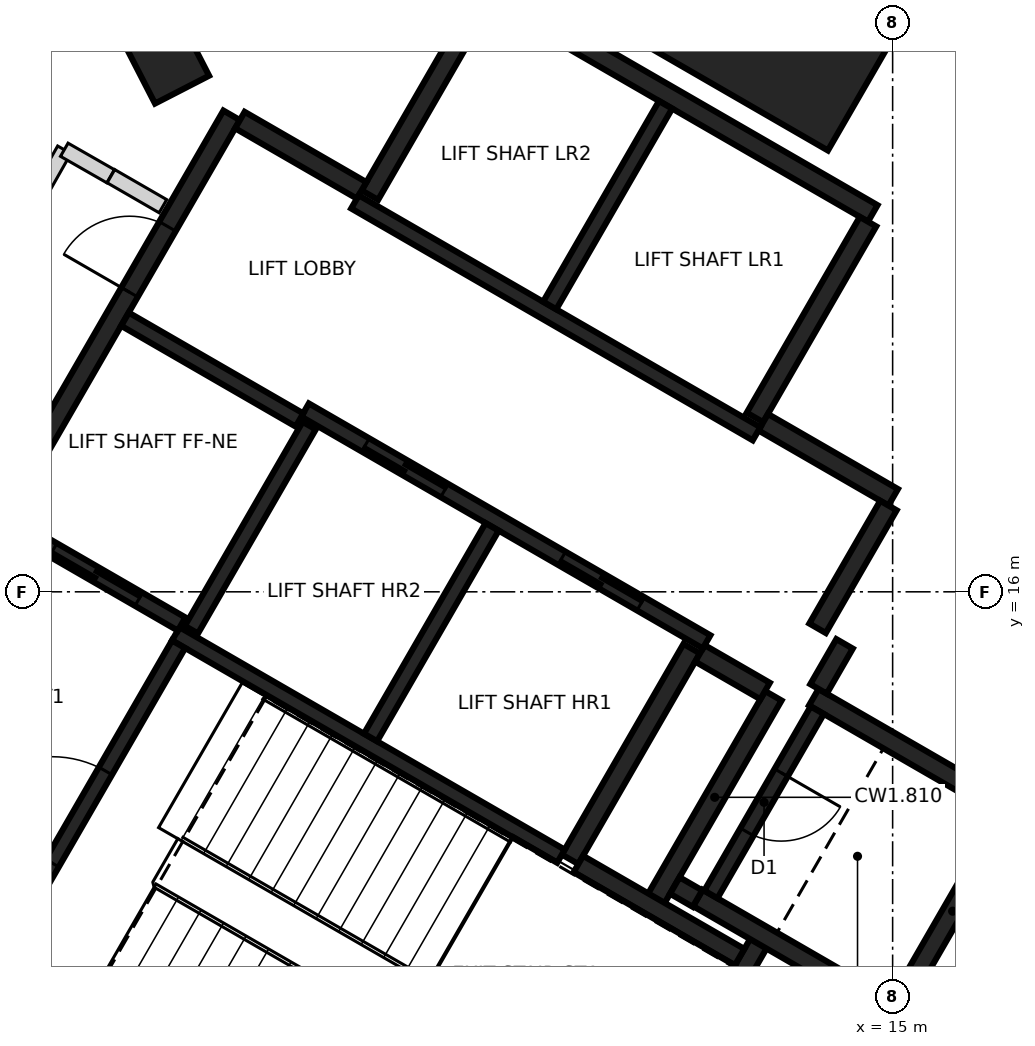
"""IFC4 building model, lengths in metres.
Left out: names, types, materials, properties, quantities, classifications, styles, units other than length and angle.
Written with IfcOpenShell. Run it as: python <this file> out.ifc"""

import sys

from ifc_helpers import new_model, si_unit, direction, frame, frame_2d, origin, origin_2d, place, context, subcontext, project, spatial, rectangle, extrude, element, fill, save


model = new_model("IFC4")
c1 = context("Model", 3, precision=1e-05, world=origin(), true_north=direction((0.0, 1.0)))
c2 = subcontext(c1, "Body", "Model", "MODEL_VIEW")
j1 = project(units=[si_unit("LENGTHUNIT", "METRE"), si_unit("PLANEANGLEUNIT", "RADIAN")], contexts=[c1])
p1 = place(None, origin())
s1 = spatial("IfcSite", under=j1, at=p1, CompositionType="ELEMENT")
p2 = place(p1, origin())
s2 = spatial("IfcBuilding", under=s1, at=p2, CompositionType="ELEMENT")
p3 = place(p2, frame((0.0, 0.0, 175.6)))
s3 = spatial("IfcBuildingStorey", under=s2, at=p3, CompositionType="ELEMENT", Elevation=175.6)
p4 = place(p3, frame((5.388, 23.118, -0.35), z_axis=(0.0, 0.0, 1.0), x_axis=(-0.457548042569, 0.889184901323, 0.0)))
e1 = element("IfcColumn", 1, at=p4, inside=s3, PredefinedType="COLUMN", context=c2, shape_type="SweptSolid", body=[
    extrude(rectangle(XDim=1.15, YDim=0.8, at=origin_2d()), origin(), (0.0, 0.0, 1.0), 3.6),
])
p5 = place(p3, frame((13.78, 23.867, -0.35), z_axis=(0.0, 0.0, 1.0), x_axis=(0.5, 0.866025403784, 0.0)))
e2 = element("IfcColumn", 2, at=p5, inside=s3, PredefinedType="COLUMN", context=c2, shape_type="SweptSolid", body=[
    extrude(rectangle(XDim=3.2, YDim=2.7, at=origin_2d()), origin(), (0.0, 0.0, 1.0), 3.6),
])
p6 = place(p3, frame((10.42, 6.498, 0.0), z_axis=(0.0, 0.0, 1.0), x_axis=(-0.866021906294, 0.500006057782, 0.0)))
e3 = element("IfcWall", 3, at=p6, inside=s3, PredefinedType="SHEAR", context=c2, shape_type="SweptSolid", body=[
    extrude(rectangle(XDim=11.55, YDim=0.25, at=frame_2d((5.775, 0.0))), origin(), (0.0, 0.0, 1.0), 3.25),
])
p7 = place(p6, frame((10.025, 0.0, 0.0)))
e4 = element("IfcOpeningElement", 4, at=p7, cuts=e3, PredefinedType="OPENING", context=c2, shape_type="SweptSolid", body=[
    extrude(rectangle(XDim=1.2, YDim=2.1, at=frame_2d((0.6, 1.05))), frame((0.0, 0.135, 0.0), z_axis=(0.0, -1.0, 0.0), x_axis=(1.0, 0.0, 0.0)), (0.0, 0.0, 1.0), 0.27),
])
p8 = place(p6, frame((8.725, 0.0, 0.0)))
e5 = element("IfcOpeningElement", 5, at=p8, cuts=e3, PredefinedType="OPENING", context=c2, shape_type="SweptSolid", body=[
    extrude(rectangle(XDim=1.2, YDim=2.1, at=frame_2d((0.6, 1.05))), frame((0.0, 0.135, 0.0), z_axis=(0.0, -1.0, 0.0), x_axis=(1.0, 0.0, 0.0)), (0.0, 0.0, 1.0), 0.27),
])
p9 = place(p3, frame((3.179, 16.856, 0.0), z_axis=(0.0, 0.0, 1.0), x_axis=(0.500004234368, 0.866022959057, 0.0)))
e6 = element("IfcWall", 6, at=p9, inside=s3, PredefinedType="SHEAR", context=c2, shape_type="SweptSolid", body=[
    extrude(rectangle(XDim=6.25, YDim=0.25, at=frame_2d((3.125, 0.0))), origin(), (0.0, 0.0, 1.0), 3.25),
])
p10 = place(p9, frame((3.563, 0.0, 0.0)))
e7 = element("IfcOpeningElement", 7, at=p10, cuts=e6, PredefinedType="OPENING", context=c2, shape_type="SweptSolid", body=[
    extrude(rectangle(XDim=1.0, YDim=2.1, at=frame_2d((0.5, 1.05))), frame((0.0, 0.135, 0.0), z_axis=(0.0, -1.0, 0.0), x_axis=(1.0, 0.0, 0.0)), (0.0, 0.0, 1.0), 0.27),
])
p11 = place(p3, frame((9.673, 23.903, 0.0), z_axis=(0.0, 0.0, 1.0), x_axis=(0.86603616409, -0.499981362141, 0.0)))
e8 = element("IfcWall", 8, at=p11, inside=s3, PredefinedType="SHEAR", context=c2, shape_type="SweptSolid", body=[
    extrude(rectangle(XDim=5.85, YDim=0.25, at=frame_2d((2.925, 0.0))), origin(), (0.0, 0.0, 1.0), 3.25),
])
p12 = place(p3, frame((13.238, 11.378, 0.0), z_axis=(0.0, 0.0, 1.0), x_axis=(-0.500008851346, -0.866020293397, 0.0)))
e9 = element("IfcWall", 9, at=p12, inside=s3, PredefinedType="SHEAR", context=c2, shape_type="SweptSolid", body=[
    extrude(rectangle(XDim=5.51, YDim=0.25, at=frame_2d((2.755, 0.0))), origin(), (0.0, 0.0, 1.0), 3.25),
])
p13 = place(p3, frame((12.357, 15.252, 0.0), z_axis=(0.0, 0.0, 1.0), x_axis=(-0.500028443584, -0.866008981251, 0.0)))
e10 = element("IfcWall", 10, at=p13, inside=s3, PredefinedType="SHEAR", context=c2, shape_type="SweptSolid", body=[
    extrude(rectangle(XDim=3.2, YDim=0.25, at=frame_2d((1.6, 0.0))), origin(), (0.0, 0.0, 1.0), 3.25),
])
for number, where, z_axis, x_axis in (
    (11, (8.123, 21.219, 0.0), (0.0, 0.0, 1.0), (0.5, 0.866, 0.0)),
    (12, (14.676, 20.87, 0.0), (0.0, 0.0, 1.0), (-0.5, -0.866, 0.0)),
):
    element("IfcWall", number, at=place(p3, frame(where, z_axis=z_axis, x_axis=x_axis)), inside=s3, PredefinedType="SHEAR", context=c2, shape_type="SweptSolid", body=[
        extrude(rectangle(XDim=2.975, YDim=0.25, at=frame_2d((1.487, 0.0))), origin(), (0.0, 0.0, 1.0), 3.25),
    ])
p14 = place(p3, frame((16.552, 13.119, 0.0), z_axis=(0.0, 0.0, 1.0), x_axis=(-0.499978833458, -0.866037623948, 0.0)))
e13 = element("IfcWall", 13, at=p14, inside=s3, PredefinedType="SHEAR", context=c2, shape_type="SweptSolid", body=[
    extrude(rectangle(XDim=3.05, YDim=0.25, at=frame_2d((1.525, 0.0))), origin(), (0.0, 0.0, 1.0), 3.25),
])
p15 = place(p3, frame((14.918, 10.54, 0.0), z_axis=(0.0, 0.0, 1.0), x_axis=(-0.866063538972, 0.499933942099, 0.0)))
e14 = element("IfcWall", 14, at=p15, inside=s3, PredefinedType="SHEAR", context=c2, shape_type="SweptSolid", body=[
    extrude(rectangle(XDim=2.865, YDim=0.25, at=frame_2d((1.432, 0.0))), origin(), (0.0, 0.0, 1.0), 3.25),
])
p16 = place(p3, frame((13.963, 14.614, 0.0), z_axis=(0.0, 0.0, 1.0), x_axis=(0.866042235819, -0.499970844928, 0.0)))
e15 = element("IfcWall", 15, at=p16, inside=s3, PredefinedType="SHEAR", context=c2, shape_type="SweptSolid", body=[
    extrude(rectangle(XDim=2.865, YDim=0.25, at=frame_2d((1.432, 0.0))), origin(), (0.0, 0.0, 1.0), 3.25),
])
p17 = place(p3, frame((11.888, 11.961, 0.0), z_axis=(0.0, 0.0, 1.0), x_axis=(0.500003324108, 0.866023484601, 0.0)))
e16 = element("IfcWall", 16, at=p17, inside=s3, PredefinedType="SHEAR", context=c2, shape_type="SweptSolid", body=[
    extrude(rectangle(XDim=3.085, YDim=0.25, at=frame_2d((1.542, 0.0))), origin(), (0.0, 0.0, 1.0), 3.25),
])
p18 = place(p3, frame((10.865, 12.418, 0.0), z_axis=(0.0, 0.0, 1.0), x_axis=(0.866026229868, -0.499998569178, 0.0)))
e17 = element("IfcWall", 17, at=p18, inside=s3, PredefinedType="SHEAR", context=c2, shape_type="SweptSolid", body=[
    extrude(rectangle(XDim=2.449, YDim=0.25, at=frame_2d((1.225, 0.0))), origin(), (0.0, 0.0, 1.0), 3.25),
])
p19 = place(p3, frame((13.297, 18.231, 0.0), z_axis=(0.0, 0.0, 1.0), x_axis=(0.866043531843, -0.499968599967, 0.0)))
e18 = element("IfcWall", 18, at=p19, inside=s3, PredefinedType="SHEAR", context=c2, shape_type="SweptSolid", body=[
    extrude(rectangle(XDim=1.975, YDim=0.25, at=frame_2d((0.987, 0.0))), origin(), (0.0, 0.0, 1.0), 3.25),
])
p20 = place(p3, frame((6.413, 22.206, 0.0), z_axis=(0.0, 0.0, 1.0), x_axis=(0.866016279763, -0.500015802937, 0.0)))
e19 = element("IfcWall", 19, at=p20, inside=s3, PredefinedType="SHEAR", context=c2, shape_type="SweptSolid", body=[
    extrude(rectangle(XDim=1.849, YDim=0.25, at=frame_2d((0.925, 0.0))), origin(), (0.0, 0.0, 1.0), 3.25),
])
p21 = place(p3, frame((14.945, 17.135, 0.0), z_axis=(0.0, 0.0, 1.0), x_axis=(-0.499983108224, -0.866035156036, 0.0)))
e20 = element("IfcWall", 20, at=p21, inside=s3, PredefinedType="SHEAR", context=c2, shape_type="SweptSolid", body=[
    extrude(rectangle(XDim=1.865, YDim=0.25, at=frame_2d((0.932, 0.0))), origin(), (0.0, 0.0, 1.0), 3.25),
])
p22 = place(p3, frame((13.322, 14.695, 0.0), z_axis=(0.0, 0.0, 1.0), x_axis=(-0.866017078145, 0.500014420154, 0.0)))
e21 = element("IfcWall", 21, at=p22, inside=s3, PredefinedType="SHEAR", context=c2, shape_type="SweptSolid", body=[
    extrude(rectangle(XDim=0.989, YDim=0.25, at=frame_2d((0.495, 0.0))), origin(), (0.0, 0.0, 1.0), 3.25),
])
p23 = place(p3, frame((14.368, 15.315, 0.0), z_axis=(0.0, 0.0, 1.0), x_axis=(-0.499897359611, -0.866084655132, 0.0)))
e22 = element("IfcWall", 22, at=p23, inside=s3, PredefinedType="SHEAR", context=c2, shape_type="SweptSolid", body=[
    extrude(rectangle(XDim=0.685, YDim=0.25, at=frame_2d((0.342, 0.0))), origin(), (0.0, 0.0, 1.0), 3.25),
])
p24 = place(p3, frame((12.433, 11.964, 0.0), z_axis=(0.0, 0.0, 1.0), x_axis=(-0.866055875208, 0.499947218231, 0.0)))
e23 = element("IfcWall", 23, at=p24, inside=s3, PredefinedType="SHEAR", context=c2, shape_type="SweptSolid", body=[
    extrude(rectangle(XDim=0.345, YDim=0.25, at=frame_2d((0.172, 0.0))), origin(), (0.0, 0.0, 1.0), 3.25),
])
p25 = place(p3, frame((13.21, 18.08, 0.0), z_axis=(0.0, 0.0, 1.0), x_axis=(-0.866030299012, 0.499991521122, 0.0)))
e24 = element("IfcWall", 24, at=p25, inside=s3, PredefinedType="SHEAR", context=c2, shape_type="SweptSolid", body=[
    extrude(rectangle(XDim=6.1, YDim=0.2, at=frame_2d((3.05, 0.0))), origin(), (0.0, 0.0, 1.0), 3.25),
])
p26 = place(p3, frame((12.552, 15.342, 0.0), z_axis=(0.0, 0.0, 1.0), x_axis=(-0.866030299012, 0.499991521122, 0.0)))
e25 = element("IfcWall", 25, at=p26, inside=s3, PredefinedType="SHEAR", context=c2, shape_type="SweptSolid", body=[
    extrude(rectangle(XDim=6.1, YDim=0.2, at=frame_2d((3.05, 0.0))), origin(), (0.0, 0.0, 1.0), 3.25),
])
p27 = place(p26, frame((1.0, 0.0, 0.0)))
e26 = element("IfcOpeningElement", 26, at=p27, cuts=e25, PredefinedType="OPENING", context=c2, shape_type="SweptSolid", body=[
    extrude(rectangle(XDim=1.2, YDim=2.1, at=frame_2d((0.6, 1.05))), frame((0.0, 0.11, 0.0), z_axis=(0.0, -1.0, 0.0), x_axis=(1.0, 0.0, 0.0)), (0.0, 0.0, 1.0), 0.22),
])
p28 = place(p26, frame((3.982, 0.0, 0.0)))
e27 = element("IfcOpeningElement", 27, at=p28, cuts=e25, PredefinedType="OPENING", context=c2, shape_type="SweptSolid", body=[
    extrude(rectangle(XDim=1.2, YDim=2.1, at=frame_2d((0.6, 1.05))), frame((0.0, 0.11, 0.0), z_axis=(0.0, -1.0, 0.0), x_axis=(1.0, 0.0, 0.0)), (0.0, 0.0, 1.0), 0.22),
])
p29 = place(p3, frame((10.636, 12.521, 0.0), z_axis=(0.0, 0.0, 1.0), x_axis=(-0.866013252188, 0.500021046592, 0.0)))
e28 = element("IfcWall", 28, at=p29, inside=s3, PredefinedType="SHEAR", context=c2, shape_type="SweptSolid", body=[
    extrude(rectangle(XDim=5.851, YDim=0.2, at=frame_2d((2.925, 0.0))), origin(), (0.0, 0.0, 1.0), 3.25),
])
p30 = place(p3, frame((3.057, 10.895, 0.0), z_axis=(0.0, 0.0, 1.0), x_axis=(0.500027839223, 0.866009330205, 0.0)))
e29 = element("IfcWall", 29, at=p30, inside=s3, PredefinedType="SHEAR", context=c2, shape_type="SweptSolid", body=[
    extrude(rectangle(XDim=5.098, YDim=0.2, at=frame_2d((2.549, 0.0))), origin(), (0.0, 0.0, 1.0), 3.25),
])
p31 = place(p30, frame((1.774, 0.0, 0.0)))
e30 = element("IfcOpeningElement", 30, at=p31, cuts=e29, PredefinedType="OPENING", context=c2, shape_type="SweptSolid", body=[
    extrude(rectangle(XDim=1.4, YDim=2.1, at=frame_2d((0.7, 1.05))), frame((0.0, 0.11, 0.0), z_axis=(0.0, -1.0, 0.0), x_axis=(1.0, 0.0, 0.0)), (0.0, 0.0, 1.0), 0.22),
])
p32 = place(p3, frame((8.132, 14.084, 0.0), z_axis=(0.0, 0.0, 1.0), x_axis=(0.500030834389, 0.86600760081, 0.0)))
e31 = element("IfcWall", 31, at=p32, inside=s3, PredefinedType="SHEAR", context=c2, shape_type="SweptSolid", body=[
    extrude(rectangle(XDim=3.198, YDim=0.2, at=frame_2d((1.599, 0.0))), origin(), (0.0, 0.0, 1.0), 3.25),
])
p33 = place(p3, frame((10.489, 19.767, 0.0), z_axis=(0.0, 0.0, 1.0), x_axis=(0.499946628782, 0.866056215479, 0.0)))
e32 = element("IfcWall", 32, at=p33, inside=s3, PredefinedType="SHEAR", context=c2, shape_type="SweptSolid", body=[
    extrude(rectangle(XDim=3.048, YDim=0.2, at=frame_2d((1.524, 0.0))), origin(), (0.0, 0.0, 1.0), 3.25),
])
p34 = place(p3, frame((14.008, 14.442, 0.0), z_axis=(0.0, 0.0, 1.0), x_axis=(-0.499986818241, -0.866033014143, 0.0)))
e33 = element("IfcWall", 33, at=p34, inside=s3, PredefinedType="SHEAR", context=c2, shape_type="SweptSolid", body=[
    extrude(rectangle(XDim=2.798, YDim=0.2, at=frame_2d((1.399, 0.0))), origin(), (0.0, 0.0, 1.0), 3.25),
])
p35 = place(p34, frame((0.949, 0.0, 0.0)))
e34 = element("IfcOpeningElement", 34, at=p35, cuts=e33, PredefinedType="OPENING", context=c2, shape_type="SweptSolid", body=[
    extrude(rectangle(XDim=0.9, YDim=2.1, at=frame_2d((0.45, 1.05))), frame((0.0, 0.11, 0.0), z_axis=(0.0, -1.0, 0.0), x_axis=(1.0, 0.0, 0.0)), (0.0, 0.0, 1.0), 0.22),
])
p36 = place(p3, frame((7.324, 18.187, 0.0), z_axis=(0.0, 0.0, 1.0), x_axis=(-0.499967891604, -0.866043940782, 0.0)))
e35 = element("IfcWall", 35, at=p36, inside=s3, PredefinedType="SHEAR", context=c2, shape_type="SweptSolid", body=[
    extrude(rectangle(XDim=3.1, YDim=0.2, at=frame_2d((1.55, 0.0))), origin(), (0.0, 0.0, 1.0), 3.25),
])
p37 = place(p3, frame((5.646, 15.576, 0.0), z_axis=(0.0, 0.0, 1.0), x_axis=(-0.866018407898, 0.500012117035, 0.0)))
e36 = element("IfcWall", 36, at=p37, inside=s3, PredefinedType="SHEAR", context=c2, shape_type="SweptSolid", body=[
    extrude(rectangle(XDim=2.651, YDim=0.2, at=frame_2d((1.325, 0.0))), origin(), (0.0, 0.0, 1.0), 3.25),
])
p38 = place(p37, frame((0.652, 0.0, 0.0)))
e37 = element("IfcOpeningElement", 37, at=p38, cuts=e36, PredefinedType="OPENING", context=c2, shape_type="SweptSolid", body=[
    extrude(rectangle(XDim=1.3, YDim=2.1, at=frame_2d((0.65, 1.05))), frame((0.0, 0.11, 0.0), z_axis=(0.0, -1.0, 0.0), x_axis=(1.0, 0.0, 0.0)), (0.0, 0.0, 1.0), 0.22),
])
p39 = place(p3, frame((7.196, 18.26, 0.0), z_axis=(0.0, 0.0, 1.0), x_axis=(-0.866018407898, 0.500012117035, 0.0)))
e38 = element("IfcWall", 38, at=p39, inside=s3, PredefinedType="SHEAR", context=c2, shape_type="SweptSolid", body=[
    extrude(rectangle(XDim=2.651, YDim=0.2, at=frame_2d((1.325, 0.0))), origin(), (0.0, 0.0, 1.0), 3.25),
])
p40 = place(p3, frame((-1.035, 12.742, 0.0), z_axis=(0.0, 0.0, 1.0), x_axis=(0.49267817774, 0.870211591039, 0.0)))
e39 = element("IfcWall", 39, at=p40, inside=s3, PredefinedType="PARTITIONING", context=c2, shape_type="SweptSolid", body=[
    extrude(rectangle(XDim=10.427, YDim=0.2, at=frame_2d((5.214, 0.0))), origin(), (0.0, 0.0, 1.0), 3.25),
])
p41 = place(p40, frame((5.568, 0.0, 0.0)))
e40 = element("IfcOpeningElement", 40, at=p41, cuts=e39, PredefinedType="OPENING", context=c2, shape_type="SweptSolid", body=[
    extrude(rectangle(XDim=1.0, YDim=2.1, at=frame_2d((0.5, 1.05))), frame((0.0, 0.11, 0.0), z_axis=(0.0, -1.0, 0.0), x_axis=(1.0, 0.0, 0.0)), (0.0, 0.0, 1.0), 0.22),
])
p42 = place(p3, frame((4.102, 21.816, 0.0), z_axis=(0.0, 0.0, 1.0), x_axis=(0.868007826562, -0.496550514074, 0.0)))
e41 = element("IfcWall", 41, at=p42, inside=s3, PredefinedType="PARTITIONING", context=c2, shape_type="SweptSolid", body=[
    extrude(rectangle(XDim=0.703, YDim=0.2, at=frame_2d((0.351, 0.0))), origin(), (0.0, 0.0, 1.0), 3.25),
])
p43 = place(p3, frame((4.716, 21.468, 0.0), z_axis=(0.0, 0.0, 1.0), x_axis=(0.865912682783, -0.500195187698, 0.0)))
e42 = element("IfcWall", 42, at=p43, inside=s3, PredefinedType="PARTITIONING", context=c2, shape_type="SweptSolid", body=[
    extrude(rectangle(XDim=0.79, YDim=0.2, at=frame_2d((0.395, 0.0))), origin(), (0.0, 0.0, 1.0), 3.25),
])
p44 = place(p38, origin())
e43 = element("IfcDoor", 43, at=p44, inside=s3, OperationType="SLIDING_TO_RIGHT", PredefinedType="DOOR", context=c2, shape_type="SweptSolid", body=[
    extrude(rectangle(XDim=1.3, YDim=2.1, at=frame_2d((0.65, 1.05))), frame((0.0, 0.025, 0.0), z_axis=(0.0, -1.0, 0.0), x_axis=(1.0, 0.0, 0.0)), (0.0, 0.0, 1.0), 0.05),
])
fill(e37, e43)
p45 = place(p27, origin())
e44 = element("IfcDoor", 44, at=p45, inside=s3, OperationType="DOUBLE_DOOR_SLIDING", PredefinedType="DOOR", context=c2, shape_type="SweptSolid", body=[
    extrude(rectangle(XDim=1.2, YDim=2.1, at=frame_2d((0.6, 1.05))), frame((0.0, 0.025, 0.0), z_axis=(0.0, -1.0, 0.0), x_axis=(1.0, 0.0, 0.0)), (0.0, 0.0, 1.0), 0.05),
])
fill(e26, e44)
p46 = place(p28, origin())
e45 = element("IfcDoor", 45, at=p46, inside=s3, OperationType="DOUBLE_DOOR_SLIDING", PredefinedType="DOOR", context=c2, shape_type="SweptSolid", body=[
    extrude(rectangle(XDim=1.2, YDim=2.1, at=frame_2d((0.6, 1.05))), frame((0.0, 0.025, 0.0), z_axis=(0.0, -1.0, 0.0), x_axis=(1.0, 0.0, 0.0)), (0.0, 0.0, 1.0), 0.05),
])
fill(e27, e45)
p47 = place(p10, origin())
e46 = element("IfcDoor", 46, at=p47, inside=s3, OperationType="SINGLE_SWING_LEFT", PredefinedType="DOOR", context=c2, shape_type="SweptSolid", body=[
    extrude(rectangle(XDim=1.0, YDim=2.1, at=frame_2d((0.5, 1.05))), frame((0.0, 0.025, 0.0), z_axis=(0.0, -1.0, 0.0), x_axis=(1.0, 0.0, 0.0)), (0.0, 0.0, 1.0), 0.05),
])
fill(e7, e46)
p48 = place(p31, origin())
e47 = element("IfcDoor", 47, at=p48, inside=s3, OperationType="SINGLE_SWING_RIGHT", PredefinedType="DOOR", context=c2, shape_type="SweptSolid", body=[
    extrude(rectangle(XDim=1.4, YDim=2.1, at=frame_2d((0.7, 1.05))), frame((0.0, 0.025, 0.0), z_axis=(0.0, -1.0, 0.0), x_axis=(1.0, 0.0, 0.0)), (0.0, 0.0, 1.0), 0.05),
])
fill(e30, e47)
p49 = place(p35, origin())
e48 = element("IfcDoor", 48, at=p49, inside=s3, OperationType="SINGLE_SWING_LEFT", PredefinedType="DOOR", context=c2, shape_type="SweptSolid", body=[
    extrude(rectangle(XDim=0.9, YDim=2.1, at=frame_2d((0.45, 1.05))), frame((0.0, 0.025, 0.0), z_axis=(0.0, -1.0, 0.0), x_axis=(1.0, 0.0, 0.0)), (0.0, 0.0, 1.0), 0.05),
])
fill(e34, e48)
save(model, sys.argv[1])
